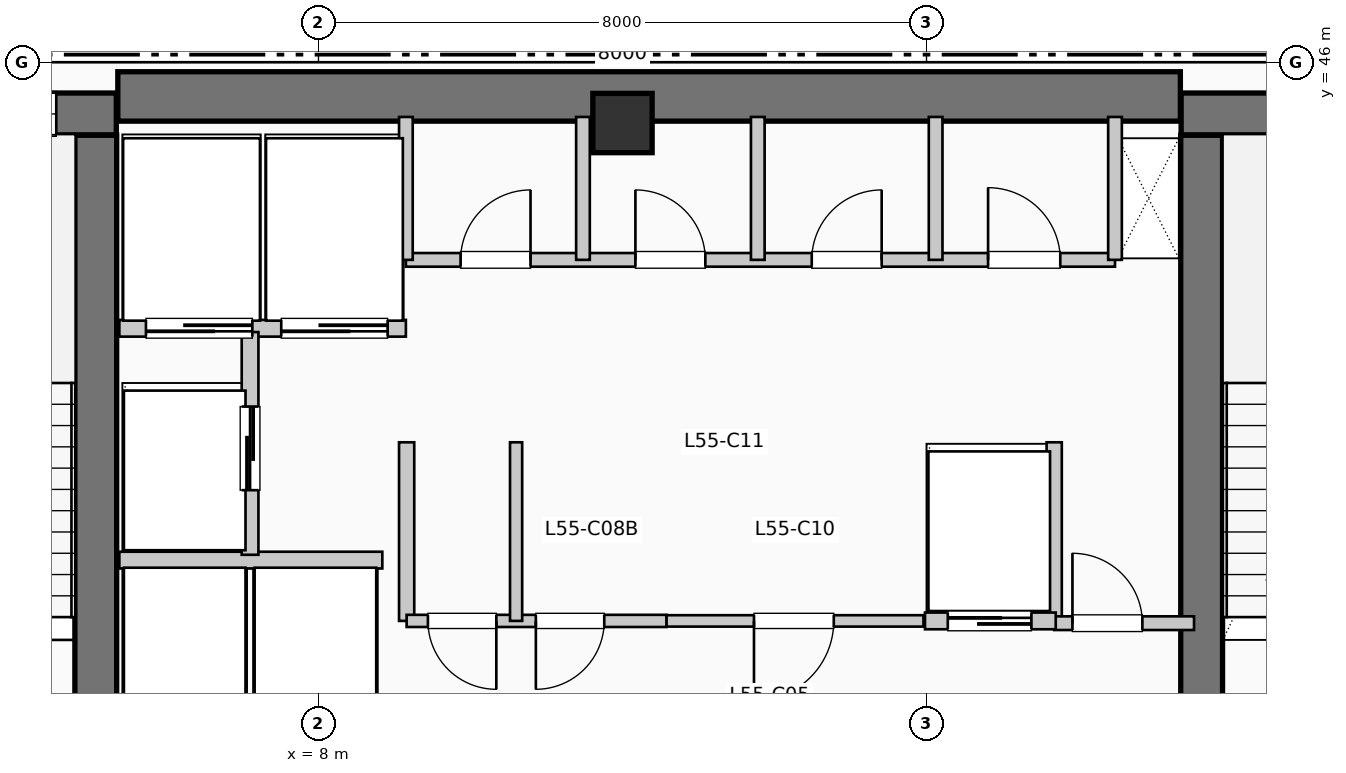
"""IFC4 building model, lengths in metres.
Left out: names, types, materials, properties, quantities, classifications, styles, units other than length and angle.
Written with IfcOpenShell. Run it as: python <this file> out.ifc"""

import sys

from ifc_helpers import new_model, si_unit, direction, frame, frame_2d, origin, origin_2d, place, context, subcontext, project, spatial, rectangle, extrude, element, fill, save


model = new_model("IFC4")
c1 = context("Model", 3, precision=1e-05, world=origin(), true_north=direction((0.0, 1.0)))
c2 = subcontext(c1, "Body", "Model", "MODEL_VIEW")
j1 = project(units=[si_unit("LENGTHUNIT", "METRE"), si_unit("PLANEANGLEUNIT", "RADIAN")], contexts=[c1])
p1 = place(None, origin())
s1 = spatial("IfcSite", under=j1, at=p1, CompositionType="ELEMENT")
p2 = place(p1, origin())
s2 = spatial("IfcBuilding", under=s1, at=p2, CompositionType="ELEMENT")
p3 = place(p2, frame((0.0, 0.0, 227.7)))
s3 = spatial("IfcBuildingStorey", under=s2, at=p3, CompositionType="ELEMENT", Elevation=227.7)
p4 = place(p3, frame((5.36, 45.55, 0.0), z_axis=(0.0, 0.0, 1.0), x_axis=(1.0, 0.0, 0.0)))
e1 = element("IfcWall", 1, at=p4, inside=s3, PredefinedType="SHEAR", context=c2, shape_type="SweptSolid", body=[
    extrude(rectangle(XDim=13.98, YDim=0.65, at=frame_2d((6.99, 0.0))), origin(), (0.0, 0.0, 1.0), 3.96),
])
p5 = place(p3, frame((5.07, 37.15, 0.0), z_axis=(0.0, 0.0, 1.0), x_axis=(0.0, 1.0, 0.0)))
e2 = element("IfcWall", 2, at=p5, inside=s3, PredefinedType="SHEAR", context=c2, shape_type="SweptSolid", body=[
    extrude(rectangle(XDim=7.89, YDim=0.55, at=frame_2d((3.945, 0.0))), origin(), (0.0, 0.0, 1.0), 3.96),
])
p6 = place(p3, frame((1.1, 45.32, 0.0), z_axis=(0.0, 0.0, 1.0), x_axis=(1.0, 0.0, 0.0)))
e3 = element("IfcWall", 3, at=p6, inside=s3, PredefinedType="SHEAR", context=c2, shape_type="SweptSolid", body=[
    extrude(rectangle(XDim=4.24, YDim=0.55, at=frame_2d((2.12, 0.0))), origin(), (0.0, 0.0, 1.0), 3.96),
])
p7 = place(p6, frame((2.05, 0.0, 1.05)))
e4 = element("IfcOpeningElement", 4, at=p7, cuts=e3, PredefinedType="OPENING", context=c2, shape_type="SweptSolid", body=[
    extrude(rectangle(XDim=1.4, YDim=1.8, at=frame_2d((0.7, 0.9))), frame((0.0, 0.285, 0.0), z_axis=(0.0, -1.0, 0.0), x_axis=(1.0, 0.0, 0.0)), (0.0, 0.0, 1.0), 0.57),
])
p8 = place(p3, frame((19.62, 37.15, 0.0), z_axis=(0.0, 0.0, 1.0), x_axis=(0.0, 1.0, 0.0)))
e5 = element("IfcWall", 5, at=p8, inside=s3, PredefinedType="SHEAR", context=c2, shape_type="SweptSolid", body=[
    extrude(rectangle(XDim=7.89, YDim=0.55, at=frame_2d((3.945, 0.0))), origin(), (0.0, 0.0, 1.0), 3.96),
])
p9 = place(p3, frame((19.35, 45.32, 0.0), z_axis=(0.0, 0.0, 1.0), x_axis=(1.0, 0.0, 0.0)))
e6 = element("IfcWall", 6, at=p9, inside=s3, PredefinedType="SHEAR", context=c2, shape_type="SweptSolid", body=[
    extrude(rectangle(XDim=3.69, YDim=0.55, at=frame_2d((1.845, 0.0))), origin(), (0.0, 0.0, 1.0), 3.96),
])
p10 = place(p9, frame((1.15, 0.0, 1.05)))
e7 = element("IfcOpeningElement", 7, at=p10, cuts=e6, PredefinedType="OPENING", context=c2, shape_type="SweptSolid", body=[
    extrude(rectangle(XDim=1.4, YDim=1.8, at=frame_2d((0.7, 0.9))), frame((0.0, 0.285, 0.0), z_axis=(0.0, -1.0, 0.0), x_axis=(1.0, 0.0, 0.0)), (0.0, 0.0, 1.0), 0.57),
])
p11 = place(p3, frame((12.0, 45.2, 0.0), z_axis=(0.0, 0.0, 1.0), x_axis=(1.0, 0.0, 0.0)))
e8 = element("IfcColumn", 8, at=p11, inside=s3, PredefinedType="COLUMN", context=c2, shape_type="SweptSolid", body=[
    extrude(rectangle(XDim=0.78, YDim=0.78, at=origin_2d()), origin(), (0.0, 0.0, 1.0), 3.96),
])
p12 = place(p3, frame((5.38, 39.45, 0.0), z_axis=(0.0, 0.0, 1.0), x_axis=(1.0, 0.0, 0.0)))
e9 = element("IfcWall", 9, at=p12, inside=s3, PredefinedType="PARTITIONING", context=c2, shape_type="SweptSolid", body=[
    extrude(rectangle(XDim=3.46, YDim=0.22, at=frame_2d((1.73, 0.0))), origin(), (0.0, 0.0, 1.0), 3.71),
])
p13 = place(p3, frame((5.38, 42.5, 0.0), z_axis=(0.0, 0.0, 1.0), x_axis=(1.0, 0.0, 0.0)))
e10 = element("IfcWall", 10, at=p13, inside=s3, PredefinedType="PARTITIONING", context=c2, shape_type="SweptSolid", body=[
    extrude(rectangle(XDim=3.77, YDim=0.22, at=frame_2d((1.885, 0.0))), origin(), (0.0, 0.0, 1.0), 3.71),
])
p14 = place(p13, frame((1.75, 0.0, 0.0), z_axis=(0.0, 0.0, 1.0), x_axis=(-1.0, 0.0, 0.0)))
e11 = element("IfcOpeningElement", 11, at=p14, cuts=e10, PredefinedType="OPENING", context=c2, shape_type="SweptSolid", body=[
    extrude(rectangle(XDim=1.4, YDim=2.2, at=frame_2d((0.7, 1.1))), frame((0.0, 0.12, 0.0), z_axis=(0.0, -1.0, 0.0), x_axis=(1.0, 0.0, 0.0)), (0.0, 0.0, 1.0), 0.24),
])
p15 = place(p13, frame((3.53, 0.0, 0.0), z_axis=(0.0, 0.0, 1.0), x_axis=(-1.0, 0.0, 0.0)))
e12 = element("IfcOpeningElement", 12, at=p15, cuts=e10, PredefinedType="OPENING", context=c2, shape_type="SweptSolid", body=[
    extrude(rectangle(XDim=1.4, YDim=2.2, at=frame_2d((0.7, 1.1))), frame((0.0, 0.12, 0.0), z_axis=(0.0, -1.0, 0.0), x_axis=(1.0, 0.0, 0.0)), (0.0, 0.0, 1.0), 0.24),
])
p16 = place(p3, frame((7.1, 39.52, 0.0), z_axis=(0.0, 0.0, 1.0), x_axis=(0.0, 1.0, 0.0)))
e13 = element("IfcWall", 13, at=p16, inside=s3, PredefinedType="PARTITIONING", context=c2, shape_type="SweptSolid", body=[
    extrude(rectangle(XDim=2.93, YDim=0.22, at=frame_2d((1.465, 0.0))), origin(), (0.0, 0.0, 1.0), 3.71),
])
p17 = place(p16, frame((0.85, 0.0, 0.0)))
e14 = element("IfcOpeningElement", 14, at=p17, cuts=e13, PredefinedType="OPENING", context=c2, shape_type="SweptSolid", body=[
    extrude(rectangle(XDim=1.1, YDim=2.2, at=frame_2d((0.55, 1.1))), frame((0.0, 0.12, 0.0), z_axis=(0.0, -1.0, 0.0), x_axis=(1.0, 0.0, 0.0)), (0.0, 0.0, 1.0), 0.24),
])
for number, where, z_axis, x_axis in (
    (15, (9.16, 38.65, 0.0), (0.0, 0.0, 1.0), (0.0, 1.0, 0.0)),
    (16, (17.68, 38.65, 0.0), (0.0, 0.0, 1.0), (0.0, 1.0, 0.0)),
):
    element("IfcWall", number, at=place(p3, frame(where, z_axis=z_axis, x_axis=x_axis)), inside=s3, PredefinedType="PARTITIONING", context=c2, shape_type="SweptSolid", body=[
        extrude(rectangle(XDim=2.35, YDim=0.2, at=frame_2d((1.175, 0.0))), origin(), (0.0, 0.0, 1.0), 3.71),
    ])
p18 = place(p3, frame((17.68, 38.62, 0.0), z_axis=(0.0, 0.0, 1.0), x_axis=(1.0, 0.0, 0.0)))
e17 = element("IfcWall", 17, at=p18, inside=s3, PredefinedType="PARTITIONING", context=c2, shape_type="SweptSolid", body=[
    extrude(rectangle(XDim=1.84, YDim=0.18, at=frame_2d((0.92, 0.0))), origin(), (0.0, 0.0, 1.0), 3.71),
])
p19 = place(p18, frame((0.24, 0.0, 0.0)))
e18 = element("IfcOpeningElement", 18, at=p19, cuts=e17, PredefinedType="OPENING", context=c2, shape_type="SweptSolid", body=[
    extrude(rectangle(XDim=0.92, YDim=2.1, at=frame_2d((0.46, 1.05))), frame((0.0, 0.1, 0.0), z_axis=(0.0, -1.0, 0.0), x_axis=(1.0, 0.0, 0.0)), (0.0, 0.0, 1.0), 0.2),
])
p20 = place(p3, frame((9.16, 38.65, 0.0), z_axis=(0.0, 0.0, 1.0), x_axis=(1.0, 0.0, 0.0)))
e19 = element("IfcWall", 19, at=p20, inside=s3, PredefinedType="PARTITIONING", context=c2, shape_type="SweptSolid", body=[
    extrude(rectangle(XDim=3.42, YDim=0.16, at=frame_2d((1.71, 0.0))), origin(), (0.0, 0.0, 1.0), 3.71),
])
p21 = place(p20, frame((1.18, 0.0, 0.0), z_axis=(0.0, 0.0, 1.0), x_axis=(-1.0, 0.0, 0.0)))
e20 = element("IfcOpeningElement", 20, at=p21, cuts=e19, PredefinedType="OPENING", context=c2, shape_type="SweptSolid", body=[
    extrude(rectangle(XDim=0.9, YDim=2.15, at=frame_2d((0.45, 1.075))), frame((0.0, 0.09, 0.0), z_axis=(0.0, -1.0, 0.0), x_axis=(1.0, 0.0, 0.0)), (0.0, 0.0, 1.0), 0.18),
])
p22 = place(p20, frame((2.6, 0.0, 0.0), z_axis=(0.0, 0.0, 1.0), x_axis=(-1.0, 0.0, 0.0)))
e21 = element("IfcOpeningElement", 21, at=p22, cuts=e19, PredefinedType="OPENING", context=c2, shape_type="SweptSolid", body=[
    extrude(rectangle(XDim=0.9, YDim=2.15, at=frame_2d((0.45, 1.075))), frame((0.0, 0.09, 0.0), z_axis=(0.0, -1.0, 0.0), x_axis=(1.0, 0.0, 0.0)), (0.0, 0.0, 1.0), 0.18),
])
p23 = place(p3, frame((10.6, 38.65, 0.0), z_axis=(0.0, 0.0, 1.0), x_axis=(0.0, 1.0, 0.0)))
e22 = element("IfcWall", 22, at=p23, inside=s3, PredefinedType="PARTITIONING", context=c2, shape_type="SweptSolid", body=[
    extrude(rectangle(XDim=2.35, YDim=0.16, at=frame_2d((1.175, 0.0))), origin(), (0.0, 0.0, 1.0), 3.71),
])
p24 = place(p3, frame((12.58, 38.65, 0.0), z_axis=(0.0, 0.0, 1.0), x_axis=(1.0, 0.0, 0.0)))
e23 = element("IfcWall", 23, at=p24, inside=s3, PredefinedType="PARTITIONING", context=c2, shape_type="SweptSolid", body=[
    extrude(rectangle(XDim=3.38, YDim=0.15, at=frame_2d((1.69, 0.0))), origin(), (0.0, 0.0, 1.0), 3.71),
])
p25 = place(p24, frame((2.2, 0.0, 0.0), z_axis=(0.0, 0.0, 1.0), x_axis=(-1.0, 0.0, 0.0)))
e24 = element("IfcOpeningElement", 24, at=p25, cuts=e23, PredefinedType="OPENING", context=c2, shape_type="SweptSolid", body=[
    extrude(rectangle(XDim=1.05, YDim=2.15, at=frame_2d((0.525, 1.075))), frame((0.0, 0.085, 0.0), z_axis=(0.0, -1.0, 0.0), x_axis=(1.0, 0.0, 0.0)), (0.0, 0.0, 1.0), 0.17),
])
p26 = place(p3, frame((15.98, 38.65, 0.0), z_axis=(0.0, 0.0, 1.0), x_axis=(1.0, 0.0, 0.0)))
e25 = element("IfcWall", 25, at=p26, inside=s3, PredefinedType="PARTITIONING", context=c2, shape_type="SweptSolid", body=[
    extrude(rectangle(XDim=1.72, YDim=0.22, at=frame_2d((0.86, 0.0))), origin(), (0.0, 0.0, 1.0), 3.71),
])
p27 = place(p26, frame((0.3, 0.0, 0.0)))
e26 = element("IfcOpeningElement", 26, at=p27, cuts=e25, PredefinedType="OPENING", context=c2, shape_type="SweptSolid", body=[
    extrude(rectangle(XDim=1.1, YDim=2.2, at=frame_2d((0.55, 1.1))), frame((0.0, 0.12, 0.0), z_axis=(0.0, -1.0, 0.0), x_axis=(1.0, 0.0, 0.0)), (0.0, 0.0, 1.0), 0.24),
])
p28 = place(p3, frame((9.15, 43.4, 0.0), z_axis=(0.0, 0.0, 1.0), x_axis=(1.0, 0.0, 0.0)))
e27 = element("IfcWall", 27, at=p28, inside=s3, PredefinedType="PLUMBINGWALL", context=c2, shape_type="SweptSolid", body=[
    extrude(rectangle(XDim=9.33, YDim=0.18, at=frame_2d((4.665, 0.0))), origin(), (0.0, 0.0, 1.0), 3.71),
])
p29 = place(p28, frame((0.72, 0.0, 0.0)))
e28 = element("IfcOpeningElement", 28, at=p29, cuts=e27, PredefinedType="OPENING", context=c2, shape_type="SweptSolid", body=[
    extrude(rectangle(XDim=0.92, YDim=2.1, at=frame_2d((0.46, 1.05))), frame((0.0, 0.1, 0.0), z_axis=(0.0, -1.0, 0.0), x_axis=(1.0, 0.0, 0.0)), (0.0, 0.0, 1.0), 0.2),
])
p30 = place(p28, frame((3.02, 0.0, 0.0)))
e29 = element("IfcOpeningElement", 29, at=p30, cuts=e27, PredefinedType="OPENING", context=c2, shape_type="SweptSolid", body=[
    extrude(rectangle(XDim=0.92, YDim=2.1, at=frame_2d((0.46, 1.05))), frame((0.0, 0.1, 0.0), z_axis=(0.0, -1.0, 0.0), x_axis=(1.0, 0.0, 0.0)), (0.0, 0.0, 1.0), 0.2),
])
p31 = place(p28, frame((5.34, 0.0, 0.0)))
e30 = element("IfcOpeningElement", 30, at=p31, cuts=e27, PredefinedType="OPENING", context=c2, shape_type="SweptSolid", body=[
    extrude(rectangle(XDim=0.92, YDim=2.1, at=frame_2d((0.46, 1.05))), frame((0.0, 0.1, 0.0), z_axis=(0.0, -1.0, 0.0), x_axis=(1.0, 0.0, 0.0)), (0.0, 0.0, 1.0), 0.2),
])
p32 = place(p28, frame((7.66, 0.0, 0.0)))
e31 = element("IfcOpeningElement", 31, at=p32, cuts=e27, PredefinedType="OPENING", context=c2, shape_type="SweptSolid", body=[
    extrude(rectangle(XDim=0.95, YDim=2.1, at=frame_2d((0.475, 1.05))), frame((0.0, 0.1, 0.0), z_axis=(0.0, -1.0, 0.0), x_axis=(1.0, 0.0, 0.0)), (0.0, 0.0, 1.0), 0.2),
])
for number, where, z_axis, x_axis in (
    (32, (9.15, 43.4, 0.0), (0.0, 0.0, 1.0), (0.0, 1.0, 0.0)),
    (33, (18.48, 43.4, 0.0), (0.0, 0.0, 1.0), (0.0, 1.0, 0.0)),
    (34, (11.48, 43.4, 0.0), (0.0, 0.0, 1.0), (0.0, 1.0, 0.0)),
    (35, (13.78, 43.4, 0.0), (0.0, 0.0, 1.0), (0.0, 1.0, 0.0)),
    (36, (16.12, 43.4, 0.0), (0.0, 0.0, 1.0), (0.0, 1.0, 0.0)),
):
    element("IfcWall", number, at=place(p3, frame(where, z_axis=z_axis, x_axis=x_axis)), inside=s3, PredefinedType="PLUMBINGWALL", context=c2, shape_type="SweptSolid", body=[
        extrude(rectangle(XDim=1.88, YDim=0.18, at=frame_2d((0.94, 0.0))), origin(), (0.0, 0.0, 1.0), 3.71),
    ])
p33 = place(p7, origin())
e37 = element("IfcWindow", 37, at=p33, inside=s3, PartitioningType="SINGLE_PANEL", PredefinedType="WINDOW", context=c2, shape_type="SweptSolid", body=[
    extrude(rectangle(XDim=1.4, YDim=1.8, at=frame_2d((0.7, 0.9))), frame((0.0, 0.03, 0.0), z_axis=(0.0, -1.0, 0.0), x_axis=(1.0, 0.0, 0.0)), (0.0, 0.0, 1.0), 0.06),
])
fill(e4, e37)
p34 = place(p14, origin())
e38 = element("IfcDoor", 38, at=p34, inside=s3, OperationType="SLIDING_TO_LEFT", PredefinedType="DOOR", context=c2, shape_type="SweptSolid", body=[
    extrude(rectangle(XDim=1.4, YDim=2.2, at=frame_2d((0.7, 1.1))), frame((0.0, 0.025, 0.0), z_axis=(0.0, -1.0, 0.0), x_axis=(1.0, 0.0, 0.0)), (0.0, 0.0, 1.0), 0.05),
])
fill(e11, e38)
p35 = place(p15, origin())
e39 = element("IfcDoor", 39, at=p35, inside=s3, OperationType="SLIDING_TO_LEFT", PredefinedType="DOOR", context=c2, shape_type="SweptSolid", body=[
    extrude(rectangle(XDim=1.4, YDim=2.2, at=frame_2d((0.7, 1.1))), frame((0.0, 0.025, 0.0), z_axis=(0.0, -1.0, 0.0), x_axis=(1.0, 0.0, 0.0)), (0.0, 0.0, 1.0), 0.05),
])
fill(e12, e39)
p36 = place(p17, origin())
e40 = element("IfcDoor", 40, at=p36, inside=s3, OperationType="SLIDING_TO_LEFT", PredefinedType="DOOR", context=c2, shape_type="SweptSolid", body=[
    extrude(rectangle(XDim=1.1, YDim=2.2, at=frame_2d((0.55, 1.1))), frame((0.0, 0.025, 0.0), z_axis=(0.0, -1.0, 0.0), x_axis=(1.0, 0.0, 0.0)), (0.0, 0.0, 1.0), 0.05),
])
fill(e14, e40)
p37 = place(p19, origin())
e41 = element("IfcDoor", 41, at=p37, inside=s3, OperationType="SINGLE_SWING_LEFT", PredefinedType="DOOR", context=c2, shape_type="SweptSolid", body=[
    extrude(rectangle(XDim=0.92, YDim=2.1, at=frame_2d((0.46, 1.05))), frame((0.0, 0.025, 0.0), z_axis=(0.0, -1.0, 0.0), x_axis=(1.0, 0.0, 0.0)), (0.0, 0.0, 1.0), 0.05),
])
fill(e18, e41)
p38 = place(p21, origin())
e42 = element("IfcDoor", 42, at=p38, inside=s3, OperationType="SINGLE_SWING_RIGHT", PredefinedType="DOOR", context=c2, shape_type="SweptSolid", body=[
    extrude(rectangle(XDim=0.9, YDim=2.15, at=frame_2d((0.45, 1.075))), frame((0.0, 0.025, 0.0), z_axis=(0.0, -1.0, 0.0), x_axis=(1.0, 0.0, 0.0)), (0.0, 0.0, 1.0), 0.05),
])
fill(e20, e42)
p39 = place(p22, origin())
e43 = element("IfcDoor", 43, at=p39, inside=s3, OperationType="SINGLE_SWING_LEFT", PredefinedType="DOOR", context=c2, shape_type="SweptSolid", body=[
    extrude(rectangle(XDim=0.9, YDim=2.15, at=frame_2d((0.45, 1.075))), frame((0.0, 0.025, 0.0), z_axis=(0.0, -1.0, 0.0), x_axis=(1.0, 0.0, 0.0)), (0.0, 0.0, 1.0), 0.05),
])
fill(e21, e43)
p40 = place(p25, origin())
e44 = element("IfcDoor", 44, at=p40, inside=s3, OperationType="SINGLE_SWING_LEFT", PredefinedType="DOOR", context=c2, shape_type="SweptSolid", body=[
    extrude(rectangle(XDim=1.05, YDim=2.15, at=frame_2d((0.525, 1.075))), frame((0.0, 0.025, 0.0), z_axis=(0.0, -1.0, 0.0), x_axis=(1.0, 0.0, 0.0)), (0.0, 0.0, 1.0), 0.05),
])
fill(e24, e44)
p41 = place(p27, origin())
e45 = element("IfcDoor", 45, at=p41, inside=s3, OperationType="SLIDING_TO_LEFT", PredefinedType="DOOR", context=c2, shape_type="SweptSolid", body=[
    extrude(rectangle(XDim=1.1, YDim=2.2, at=frame_2d((0.55, 1.1))), frame((0.0, 0.025, 0.0), z_axis=(0.0, -1.0, 0.0), x_axis=(1.0, 0.0, 0.0)), (0.0, 0.0, 1.0), 0.05),
])
fill(e26, e45)
p42 = place(p29, origin())
e46 = element("IfcDoor", 46, at=p42, inside=s3, OperationType="SINGLE_SWING_RIGHT", PredefinedType="DOOR", context=c2, shape_type="SweptSolid", body=[
    extrude(rectangle(XDim=0.92, YDim=2.1, at=frame_2d((0.46, 1.05))), frame((0.0, 0.025, 0.0), z_axis=(0.0, -1.0, 0.0), x_axis=(1.0, 0.0, 0.0)), (0.0, 0.0, 1.0), 0.05),
])
fill(e28, e46)
p43 = place(p30, origin())
e47 = element("IfcDoor", 47, at=p43, inside=s3, OperationType="SINGLE_SWING_LEFT", PredefinedType="DOOR", context=c2, shape_type="SweptSolid", body=[
    extrude(rectangle(XDim=0.92, YDim=2.1, at=frame_2d((0.46, 1.05))), frame((0.0, 0.025, 0.0), z_axis=(0.0, -1.0, 0.0), x_axis=(1.0, 0.0, 0.0)), (0.0, 0.0, 1.0), 0.05),
])
fill(e29, e47)
p44 = place(p31, origin())
e48 = element("IfcDoor", 48, at=p44, inside=s3, OperationType="SINGLE_SWING_RIGHT", PredefinedType="DOOR", context=c2, shape_type="SweptSolid", body=[
    extrude(rectangle(XDim=0.92, YDim=2.1, at=frame_2d((0.46, 1.05))), frame((0.0, 0.025, 0.0), z_axis=(0.0, -1.0, 0.0), x_axis=(1.0, 0.0, 0.0)), (0.0, 0.0, 1.0), 0.05),
])
fill(e30, e48)
p45 = place(p32, origin())
e49 = element("IfcDoor", 49, at=p45, inside=s3, OperationType="SINGLE_SWING_LEFT", PredefinedType="DOOR", context=c2, shape_type="SweptSolid", body=[
    extrude(rectangle(XDim=0.95, YDim=2.1, at=frame_2d((0.475, 1.05))), frame((0.0, 0.025, 0.0), z_axis=(0.0, -1.0, 0.0), x_axis=(1.0, 0.0, 0.0)), (0.0, 0.0, 1.0), 0.05),
])
fill(e31, e49)
save(model, sys.argv[1])
